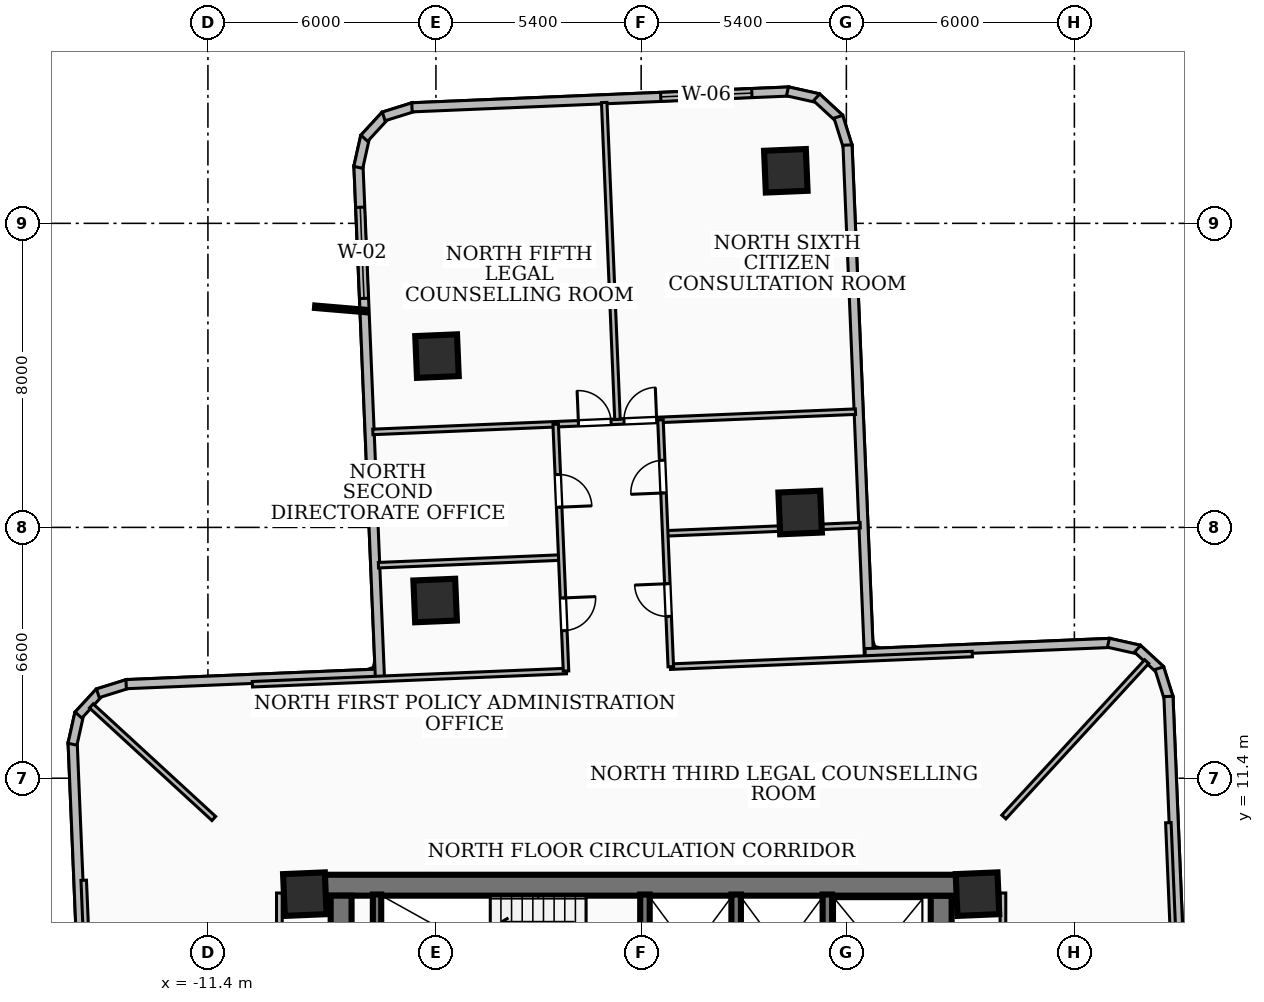
"""IFC4 building model, lengths in metres.
Left out: names, types, materials, properties, quantities, classifications, styles, units other than length and angle.
Written with IfcOpenShell. Run it as: python <this file> out.ifc"""

import sys

from ifc_helpers import new_model, si_unit, direction, frame, frame_2d, origin, origin_2d, place, context, subcontext, project, spatial, rectangle, extrude, element, fill, save


model = new_model("IFC4")
c1 = context("Model", 3, precision=1e-05, world=origin(), true_north=direction((0.0, 1.0)))
c2 = subcontext(c1, "Body", "Model", "MODEL_VIEW")
j1 = project(units=[si_unit("LENGTHUNIT", "METRE"), si_unit("PLANEANGLEUNIT", "RADIAN")], contexts=[c1])
p1 = place(None, origin())
s1 = spatial("IfcSite", under=j1, at=p1, CompositionType="ELEMENT")
p2 = place(p1, origin())
s2 = spatial("IfcBuilding", under=s1, at=p2, CompositionType="ELEMENT")
p3 = place(p2, frame((0.0, 0.0, 42.48)))
s3 = spatial("IfcBuildingStorey", under=s2, at=p3, CompositionType="ELEMENT", Elevation=42.48)
p4 = place(p3, frame((-8.78, 8.585, 0.0), z_axis=(0.0, 0.0, 1.0), x_axis=(1.0, 0.0, 0.0)))
e1 = element("IfcWall", 1, at=p4, inside=s3, PredefinedType="SHEAR", context=c2, shape_type="SweptSolid", body=[
    extrude(rectangle(XDim=17.56, YDim=0.55, at=frame_2d((8.78, 0.0))), origin(), (0.0, 0.0, 1.0), 3.34),
])
for number, where, z_axis, x_axis in (
    (2, (-7.895, 2.025, 0.0), (0.0, 0.0, 1.0), (0.0, 1.0, 0.0)),
    (3, (7.895, 8.31, 0.0), (0.0, 0.0, 1.0), (0.0, -1.0, 0.0)),
):
    element("IfcWall", number, at=place(p3, frame(where, z_axis=z_axis, x_axis=x_axis)), inside=s3, PredefinedType="SHEAR", context=c2, shape_type="SweptSolid", body=[
        extrude(rectangle(XDim=6.285, YDim=0.55, at=frame_2d((3.143, 0.0))), origin(), (0.0, 0.0, 1.0), 3.34),
    ])
p5 = place(p3, frame((-6.95, 5.28, 0.0), z_axis=(0.0, 0.0, 1.0), x_axis=(0.0, 1.0, 0.0)))
e4 = element("IfcWall", 4, at=p5, inside=s3, PredefinedType="SOLIDWALL", context=c2, shape_type="SweptSolid", body=[
    extrude(rectangle(XDim=3.06, YDim=0.22, at=frame_2d((1.53, 0.0))), origin(), (0.0, 0.0, 1.0), 3.34),
])
for number, where, z_axis, x_axis in (
    (5, (0.1, 5.3, 0.0), (0.0, 0.0, 1.0), (0.0, 1.0, 0.0)),
    (6, (2.5, 5.3, 0.0), (0.0, 0.0, 1.0), (0.0, 1.0, 0.0)),
    (7, (4.9, 5.3, 0.0), (0.0, 0.0, 1.0), (0.0, 1.0, 0.0)),
):
    element("IfcWall", number, at=place(p3, frame(where, z_axis=z_axis, x_axis=x_axis)), inside=s3, PredefinedType="SOLIDWALL", context=c2, shape_type="SweptSolid", body=[
        extrude(rectangle(XDim=3.04, YDim=0.25, at=frame_2d((1.52, 0.0))), origin(), (0.0, 0.0, 1.0), 3.34),
    ])
for number, where, z_axis, x_axis in (
    (8, (-8.85, 8.35, 0.0), (0.0, 0.0, 1.0), (0.999, 0.042, 0.0)),
    (9, (8.85, 8.35, 0.0), (0.0, 0.0, 1.0), (0.999, 0.042, 0.0)),
    (10, (4.184, 18.391, 0.0), (0.0, 0.0, 1.0), (0.999, 0.042, 0.0)),
    (11, (-5.421, 16.076, 0.0), (0.0, 0.0, 1.0), (0.999, 0.042, 0.0)),
    (12, (3.807, 27.383, 0.0), (0.0, 0.0, 1.0), (0.999, 0.042, 0.0)),
    (13, (-5.372, 22.507, 0.0), (0.0, 0.0, 1.0), (0.999, 0.042, 0.0)),
):
    element("IfcColumn", number, at=place(p3, frame(where, z_axis=z_axis, x_axis=x_axis)), inside=s3, PredefinedType="COLUMN", context=c2, shape_type="SweptSolid", body=[
        extrude(rectangle(XDim=1.1, YDim=1.1, at=origin_2d()), origin(), (0.0, 0.0, 1.0), 3.6),
    ])
p6 = place(p3, frame((-14.69, 5.894, 0.0), z_axis=(0.0, 0.0, 1.0), x_axis=(-0.041827173477, 0.999124860845, 0.0)))
e14 = element("IfcWall", 14, at=p6, inside=s3, PredefinedType="SOLIDWALL", context=c2, shape_type="SweptSolid", body=[
    extrude(rectangle(XDim=6.456, YDim=0.24, at=frame_2d((3.228, 0.0))), origin(), (0.0, 0.0, 1.0), 3.34),
])
p7 = place(p3, frame((-14.964, 12.295, 0.0), z_axis=(0.0, 0.0, 1.0), x_axis=(0.21736704137, 0.976089939158, 0.0)))
e15 = element("IfcWall", 15, at=p7, inside=s3, PredefinedType="SOLIDWALL", context=c2, shape_type="SweptSolid", body=[
    extrude(rectangle(XDim=0.829, YDim=0.24, at=frame_2d((0.415, 0.0))), origin(), (0.0, 0.0, 1.0), 3.34),
])
p8 = place(p3, frame((-14.806, 13.062, 0.0), z_axis=(0.0, 0.0, 1.0), x_axis=(0.677693750404, 0.735344259965, 0.0)))
e16 = element("IfcWall", 16, at=p8, inside=s3, PredefinedType="SOLIDWALL", context=c2, shape_type="SweptSolid", body=[
    extrude(rectangle(XDim=0.813, YDim=0.24, at=frame_2d((0.406, 0.0))), origin(), (0.0, 0.0, 1.0), 3.34),
])
p9 = place(p3, frame((-14.296, 13.635, 0.0), z_axis=(0.0, 0.0, 1.0), x_axis=(0.954396284631, 0.298542680168, 0.0)))
e17 = element("IfcWall", 17, at=p9, inside=s3, PredefinedType="SOLIDWALL", context=c2, shape_type="SweptSolid", body=[
    extrude(rectangle(XDim=0.831, YDim=0.24, at=frame_2d((0.416, 0.0))), origin(), (0.0, 0.0, 1.0), 3.34),
])
p10 = place(p3, frame((-13.552, 13.875, 0.0), z_axis=(0.0, 0.0, 1.0), x_axis=(0.999127443157, 0.041765444226, 0.0)))
e18 = element("IfcWall", 18, at=p10, inside=s3, PredefinedType="SOLIDWALL", context=c2, shape_type="SweptSolid", body=[
    extrude(rectangle(XDim=6.775, YDim=0.24, at=frame_2d((3.387, 0.0))), origin(), (0.0, 0.0, 1.0), 3.34),
])
p11 = place(p3, frame((-6.875, 14.058, 0.0), z_axis=(0.0, 0.0, 1.0), x_axis=(-0.041850586852, 0.999123880397, 0.0)))
e19 = element("IfcWall", 19, at=p11, inside=s3, PredefinedType="SOLIDWALL", context=c2, shape_type="SweptSolid", body=[
    extrude(rectangle(XDim=13.476, YDim=0.24, at=frame_2d((6.738, 0.0))), origin(), (0.0, 0.0, 1.0), 3.34),
])
p12 = place(p11, frame((9.976, 0.0, 0.85)))
e20 = element("IfcOpeningElement", 20, at=p12, cuts=e19, PredefinedType="OPENING", context=c2, shape_type="SweptSolid", body=[
    extrude(rectangle(XDim=2.4, YDim=2.1, at=frame_2d((1.2, 1.05))), frame((0.0, 0.13, 0.0), z_axis=(0.0, -1.0, 0.0), x_axis=(1.0, 0.0, 0.0)), (0.0, 0.0, 1.0), 0.26),
])
p13 = place(p3, frame((-7.443, 27.473, 0.0), z_axis=(0.0, 0.0, 1.0), x_axis=(0.21736704137, 0.976089939158, 0.0)))
e21 = element("IfcWall", 21, at=p13, inside=s3, PredefinedType="SOLIDWALL", context=c2, shape_type="SweptSolid", body=[
    extrude(rectangle(XDim=0.829, YDim=0.24, at=frame_2d((0.415, 0.0))), origin(), (0.0, 0.0, 1.0), 3.34),
])
p14 = place(p3, frame((-7.285, 28.24, 0.0), z_axis=(0.0, 0.0, 1.0), x_axis=(0.676946063044, 0.73603262681, 0.0)))
e22 = element("IfcWall", 22, at=p14, inside=s3, PredefinedType="SOLIDWALL", context=c2, shape_type="SweptSolid", body=[
    extrude(rectangle(XDim=0.814, YDim=0.24, at=frame_2d((0.407, 0.0))), origin(), (0.0, 0.0, 1.0), 3.34),
])
p15 = place(p3, frame((-6.775, 28.814, 0.0), z_axis=(0.0, 0.0, 1.0), x_axis=(0.954730695464, 0.297471509794, 0.0)))
e23 = element("IfcWall", 23, at=p15, inside=s3, PredefinedType="SOLIDWALL", context=c2, shape_type="SweptSolid", body=[
    extrude(rectangle(XDim=0.831, YDim=0.24, at=frame_2d((0.415, 0.0))), origin(), (0.0, 0.0, 1.0), 3.34),
])
p16 = place(p3, frame((-6.031, 29.053, 0.0), z_axis=(0.0, 0.0, 1.0), x_axis=(0.999123553269, 0.041858395859, 0.0)))
e24 = element("IfcWall", 24, at=p16, inside=s3, PredefinedType="SOLIDWALL", context=c2, shape_type="SweptSolid", body=[
    extrude(rectangle(XDim=9.939, YDim=0.24, at=frame_2d((4.969, 0.0))), origin(), (0.0, 0.0, 1.0), 3.34),
])
p17 = place(p16, frame((6.552, 0.0, 0.85)))
e25 = element("IfcOpeningElement", 25, at=p17, cuts=e24, PredefinedType="OPENING", context=c2, shape_type="SweptSolid", body=[
    extrude(rectangle(XDim=2.4, YDim=1.85, at=frame_2d((1.2, 0.925))), frame((0.0, 0.13, 0.0), z_axis=(0.0, -1.0, 0.0), x_axis=(1.0, 0.0, 0.0)), (0.0, 0.0, 1.0), 0.26),
])
p18 = place(p3, frame((3.85, 29.473, 0.0), z_axis=(0.0, 0.0, 1.0), x_axis=(0.976138507006, -0.217148831773, 0.0)))
e26 = element("IfcWall", 26, at=p18, inside=s3, PredefinedType="SOLIDWALL", context=c2, shape_type="SweptSolid", body=[
    extrude(rectangle(XDim=0.829, YDim=0.24, at=frame_2d((0.414, 0.0))), origin(), (0.0, 0.0, 1.0), 3.34),
])
p19 = place(p3, frame((4.617, 29.315, 0.0), z_axis=(0.0, 0.0, 1.0), x_axis=(0.735482115769, -0.677544136853, 0.0)))
e27 = element("IfcWall", 27, at=p19, inside=s3, PredefinedType="SOLIDWALL", context=c2, shape_type="SweptSolid", body=[
    extrude(rectangle(XDim=0.813, YDim=0.24, at=frame_2d((0.407, 0.0))), origin(), (0.0, 0.0, 1.0), 3.34),
])
p20 = place(p3, frame((5.19, 28.805, 0.0), z_axis=(0.0, 0.0, 1.0), x_axis=(0.298542680168, -0.954396284631, 0.0)))
e28 = element("IfcWall", 28, at=p20, inside=s3, PredefinedType="SOLIDWALL", context=c2, shape_type="SweptSolid", body=[
    extrude(rectangle(XDim=0.831, YDim=0.24, at=frame_2d((0.416, 0.0))), origin(), (0.0, 0.0, 1.0), 3.34),
])
p21 = place(p3, frame((5.43, 28.061, 0.0), z_axis=(0.0, 0.0, 1.0), x_axis=(0.041852859621, -0.999123785195, 0.0)))
e29 = element("IfcWall", 29, at=p21, inside=s3, PredefinedType="SOLIDWALL", context=c2, shape_type="SweptSolid", body=[
    extrude(rectangle(XDim=13.475, YDim=0.24, at=frame_2d((6.737, 0.0))), origin(), (0.0, 0.0, 1.0), 2.421),
])
p22 = place(p3, frame((5.894, 14.69, 0.0), z_axis=(0.0, 0.0, 1.0), x_axis=(0.999124860845, 0.041827173477, 0.0)))
e30 = element("IfcWall", 30, at=p22, inside=s3, PredefinedType="SOLIDWALL", context=c2, shape_type="SweptSolid", body=[
    extrude(rectangle(XDim=6.456, YDim=0.24, at=frame_2d((3.228, 0.0))), origin(), (0.0, 0.0, 1.0), 2.421),
])
p23 = place(p3, frame((12.295, 14.964, 0.0), z_axis=(0.0, 0.0, 1.0), x_axis=(0.976089939158, -0.21736704137, 0.0)))
e31 = element("IfcWall", 31, at=p23, inside=s3, PredefinedType="SOLIDWALL", context=c2, shape_type="SweptSolid", body=[
    extrude(rectangle(XDim=0.829, YDim=0.24, at=frame_2d((0.415, 0.0))), origin(), (0.0, 0.0, 1.0), 3.34),
])
p24 = place(p3, frame((13.062, 14.806, 0.0), z_axis=(0.0, 0.0, 1.0), x_axis=(0.735344259965, -0.677693750404, 0.0)))
e32 = element("IfcWall", 32, at=p24, inside=s3, PredefinedType="SOLIDWALL", context=c2, shape_type="SweptSolid", body=[
    extrude(rectangle(XDim=0.813, YDim=0.24, at=frame_2d((0.406, 0.0))), origin(), (0.0, 0.0, 1.0), 3.34),
])
p25 = place(p3, frame((13.635, 14.296, 0.0), z_axis=(0.0, 0.0, 1.0), x_axis=(0.298542680168, -0.954396284631, 0.0)))
e33 = element("IfcWall", 33, at=p25, inside=s3, PredefinedType="SOLIDWALL", context=c2, shape_type="SweptSolid", body=[
    extrude(rectangle(XDim=0.831, YDim=0.24, at=frame_2d((0.416, 0.0))), origin(), (0.0, 0.0, 1.0), 3.34),
])
p26 = place(p3, frame((13.875, 13.552, 0.0), z_axis=(0.0, 0.0, 1.0), x_axis=(0.041765444226, -0.999127443157, 0.0)))
e34 = element("IfcWall", 34, at=p26, inside=s3, PredefinedType="SOLIDWALL", context=c2, shape_type="SweptSolid", body=[
    extrude(rectangle(XDim=6.775, YDim=0.24, at=frame_2d((3.387, 0.0))), origin(), (0.0, 0.0, 1.0), 3.34),
])
p27 = place(p3, frame((14.058, 6.875, 0.0), z_axis=(0.0, 0.0, 1.0), x_axis=(0.999124376175, 0.04183874918, 0.0)))
e35 = element("IfcWall", 35, at=p27, inside=s3, PredefinedType="SOLIDWALL", context=c2, shape_type="SweptSolid", body=[
    extrude(rectangle(XDim=16.876, YDim=0.24, at=frame_2d((8.438, 0.0))), origin(), (0.0, 0.0, 1.0), 3.34),
])
p28 = place(p27, frame((13.376, 0.0, 0.85)))
e36 = element("IfcOpeningElement", 36, at=p28, cuts=e35, PredefinedType="OPENING", context=c2, shape_type="SweptSolid", body=[
    extrude(rectangle(XDim=2.4, YDim=1.85, at=frame_2d((1.2, 0.925))), frame((0.0, 0.13, 0.0), z_axis=(0.0, -1.0, 0.0), x_axis=(1.0, 0.0, 0.0)), (0.0, 0.0, 1.0), 0.26),
])
for number, where, z_axis, x_axis in (
    (37, (-9.52, 1.75, 0.0), (0.0, 0.0, 1.0), (0.0, 1.0, 0.0)),
    (38, (9.52, 1.75, 0.0), (0.0, 0.0, 1.0), (0.0, 1.0, 0.0)),
):
    element("IfcWall", number, at=place(p3, frame(where, z_axis=z_axis, x_axis=x_axis)), inside=s3, PredefinedType="PARTITIONING", context=c2, shape_type="SweptSolid", body=[
        extrude(rectangle(XDim=6.63, YDim=0.15, at=frame_2d((3.315, 0.0))), origin(), (0.0, 0.0, 1.0), 2.421),
    ])
p29 = place(p3, frame((9.544, 10.38, 0.0), z_axis=(0.0, 0.0, 1.0), x_axis=(0.676856513188, 0.736114977809, 0.0)))
e39 = element("IfcWall", 39, at=p29, inside=s3, PredefinedType="PARTITIONING", context=c2, shape_type="SweptSolid", body=[
    extrude(rectangle(XDim=5.554, YDim=0.145, at=frame_2d((2.777, 0.0))), origin(), (0.0, 0.0, 1.0), 3.34),
])
p30 = place(p3, frame((-11.245, 10.34, 0.0), z_axis=(0.0, 0.0, 1.0), x_axis=(-0.736178820698, 0.676787074312, 0.0)))
e40 = element("IfcWall", 40, at=p30, inside=s3, PredefinedType="PARTITIONING", context=c2, shape_type="SweptSolid", body=[
    extrude(rectangle(XDim=4.378, YDim=0.145, at=frame_2d((2.189, 0.0))), origin(), (0.0, 0.0, 1.0), 3.34),
])
for number, where, z_axis, x_axis in (
    (41, (14.22, 1.967, 0.0), (0.0, 0.0, 1.0), (-0.042, 0.999, 0.0)),
    (42, (-1.967, 14.22, 0.0), (0.0, 0.0, 1.0), (-0.999, -0.042, 0.0)),
):
    element("IfcWall", number, at=place(p3, frame(where, z_axis=z_axis, x_axis=x_axis)), inside=s3, PredefinedType="PARTITIONING", context=c2, shape_type="SweptSolid", body=[
        extrude(rectangle(XDim=8.27, YDim=0.145, at=frame_2d((4.135, 0.0))), origin(), (0.0, 0.0, 1.0), 2.421),
    ])
p31 = place(p3, frame((8.714, 14.668, 0.0), z_axis=(0.0, 0.0, 1.0), x_axis=(-0.999122557945, -0.041882146625, 0.0)))
e43 = element("IfcWall", 43, at=p31, inside=s3, PredefinedType="PARTITIONING", context=c2, shape_type="SweptSolid", body=[
    extrude(rectangle(XDim=7.951, YDim=0.145, at=frame_2d((3.976, 0.0))), origin(), (0.0, 0.0, 1.0), 2.421),
])
p32 = place(p3, frame((-2.122, 17.206, 0.0), z_axis=(0.0, 0.0, 1.0), x_axis=(-0.999119609111, -0.041952433648, 0.0)))
e44 = element("IfcWall", 44, at=p32, inside=s3, PredefinedType="PARTITIONING", context=c2, shape_type="SweptSolid", body=[
    extrude(rectangle(XDim=4.795, YDim=0.145, at=frame_2d((2.397, 0.0))), origin(), (0.0, 0.0, 1.0), 2.421),
])
p33 = place(p3, frame((5.764, 18.057, 0.0), z_axis=(0.0, 0.0, 1.0), x_axis=(-0.999125612634, -0.041809211649, 0.0)))
e45 = element("IfcWall", 45, at=p33, inside=s3, PredefinedType="PARTITIONING", context=c2, shape_type="SweptSolid", body=[
    extrude(rectangle(XDim=5.115, YDim=0.145, at=frame_2d((2.558, 0.0))), origin(), (0.0, 0.0, 1.0), 2.421),
])
p34 = place(p3, frame((-2.249, 20.714, 0.0), z_axis=(0.0, 0.0, 1.0), x_axis=(0.041843020894, -0.999124197286, 0.0)))
e46 = element("IfcWall", 46, at=p34, inside=s3, PredefinedType="PARTITIONING", context=c2, shape_type="SweptSolid", body=[
    extrude(rectangle(XDim=6.5, YDim=0.145, at=frame_2d((3.25, 0.0))), origin(), (0.0, 0.0, 1.0), 3.34),
])
p35 = place(p34, frame((4.575, 0.0, 0.0)))
e47 = element("IfcOpeningElement", 47, at=p35, cuts=e46, PredefinedType="OPENING", context=c2, shape_type="SweptSolid", body=[
    extrude(rectangle(XDim=0.86, YDim=2.04, at=frame_2d((0.43, 1.02))), frame((0.0, 0.083, 0.0), z_axis=(0.0, -1.0, 0.0), x_axis=(1.0, 0.0, 0.0)), (0.0, 0.0, 1.0), 0.165),
])
p36 = place(p34, frame((1.325, 0.0, 0.0)))
e48 = element("IfcOpeningElement", 48, at=p36, cuts=e46, PredefinedType="OPENING", context=c2, shape_type="SweptSolid", body=[
    extrude(rectangle(XDim=0.86, YDim=2.04, at=frame_2d((0.43, 1.02))), frame((0.0, 0.083, 0.0), z_axis=(0.0, -1.0, 0.0), x_axis=(1.0, 0.0, 0.0)), (0.0, 0.0, 1.0), 0.165),
])
p37 = place(p3, frame((0.78, 14.335, 0.0), z_axis=(0.0, 0.0, 1.0), x_axis=(-0.041836740669, 0.99912446028, 0.0)))
e49 = element("IfcWall", 49, at=p37, inside=s3, PredefinedType="PARTITIONING", context=c2, shape_type="SweptSolid", body=[
    extrude(rectangle(XDim=6.501, YDim=0.145, at=frame_2d((3.25, 0.0))), origin(), (0.0, 0.0, 1.0), 3.34),
])
p38 = place(p37, frame((1.325, 0.0, 0.0)))
e50 = element("IfcOpeningElement", 50, at=p38, cuts=e49, PredefinedType="OPENING", context=c2, shape_type="SweptSolid", body=[
    extrude(rectangle(XDim=0.86, YDim=2.04, at=frame_2d((0.43, 1.02))), frame((0.0, 0.083, 0.0), z_axis=(0.0, -1.0, 0.0), x_axis=(1.0, 0.0, 0.0)), (0.0, 0.0, 1.0), 0.165),
])
p39 = place(p37, frame((4.575, 0.0, 0.0)))
e51 = element("IfcOpeningElement", 51, at=p39, cuts=e49, PredefinedType="OPENING", context=c2, shape_type="SweptSolid", body=[
    extrude(rectangle(XDim=0.86, YDim=2.04, at=frame_2d((0.43, 1.02))), frame((0.0, 0.083, 0.0), z_axis=(0.0, -1.0, 0.0), x_axis=(1.0, 0.0, 0.0)), (0.0, 0.0, 1.0), 0.165),
])
p40 = place(p3, frame((-0.623, 20.842, 0.0), z_axis=(0.0, 0.0, 1.0), x_axis=(-0.041805771438, 0.999125756586, 0.0)))
e52 = element("IfcWall", 52, at=p40, inside=s3, PredefinedType="PARTITIONING", context=c2, shape_type="SweptSolid", body=[
    extrude(rectangle(XDim=8.345, YDim=0.145, at=frame_2d((4.173, 0.0))), origin(), (0.0, 0.0, 1.0), 2.832),
])
p41 = place(p3, frame((-7.06, 20.512, 0.0), z_axis=(0.0, 0.0, 1.0), x_axis=(0.99912047737, 0.041931750497, 0.0)))
e53 = element("IfcWall", 53, at=p41, inside=s3, PredefinedType="PARTITIONING", context=c2, shape_type="SweptSolid", body=[
    extrude(rectangle(XDim=12.71, YDim=0.145, at=frame_2d((6.355, 0.0))), origin(), (0.0, 0.0, 1.0), 2.421),
])
p42 = place(p41, frame((6.615, 0.0, 0.0)))
e54 = element("IfcOpeningElement", 54, at=p42, cuts=e53, PredefinedType="OPENING", context=c2, shape_type="SweptSolid", body=[
    extrude(rectangle(XDim=0.86, YDim=2.04, at=frame_2d((0.43, 1.02))), frame((0.0, 0.083, 0.0), z_axis=(0.0, -1.0, 0.0), x_axis=(1.0, 0.0, 0.0)), (0.0, 0.0, 1.0), 0.165),
])
p43 = place(p41, frame((5.415, 0.0, 0.0)))
e55 = element("IfcOpeningElement", 55, at=p43, cuts=e53, PredefinedType="OPENING", context=c2, shape_type="SweptSolid", body=[
    extrude(rectangle(XDim=0.86, YDim=2.04, at=frame_2d((0.43, 1.02))), frame((0.0, 0.083, 0.0), z_axis=(0.0, -1.0, 0.0), x_axis=(1.0, 0.0, 0.0)), (0.0, 0.0, 1.0), 0.165),
])
p44 = place(p3, frame((-14.668, 8.714, 0.0), z_axis=(0.0, 0.0, 1.0), x_axis=(0.041882146625, -0.999122557945, 0.0)))
e56 = element("IfcWall", 56, at=p44, inside=s3, PredefinedType="PARTITIONING", context=c2, shape_type="SweptSolid", body=[
    extrude(rectangle(XDim=7.951, YDim=0.145, at=frame_2d((3.976, 0.0))), origin(), (0.0, 0.0, 1.0), 2.421),
])
p45 = place(p12, origin())
e57 = element("IfcWindow", 57, at=p45, inside=s3, PartitioningType="SINGLE_PANEL", PredefinedType="WINDOW", context=c2, shape_type="SweptSolid", body=[
    extrude(rectangle(XDim=2.4, YDim=2.1, at=frame_2d((1.2, 1.05))), frame((0.0, 0.03, 0.0), z_axis=(0.0, -1.0, 0.0), x_axis=(1.0, 0.0, 0.0)), (0.0, 0.0, 1.0), 0.06),
])
fill(e20, e57)
p46 = place(p17, origin())
e58 = element("IfcWindow", 58, at=p46, inside=s3, PartitioningType="SINGLE_PANEL", PredefinedType="WINDOW", context=c2, shape_type="SweptSolid", body=[
    extrude(rectangle(XDim=2.4, YDim=1.85, at=frame_2d((1.2, 0.925))), frame((0.0, 0.03, 0.0), z_axis=(0.0, -1.0, 0.0), x_axis=(1.0, 0.0, 0.0)), (0.0, 0.0, 1.0), 0.06),
])
fill(e25, e58)
p47 = place(p35, origin())
e59 = element("IfcDoor", 59, at=p47, inside=s3, OperationType="SINGLE_SWING_LEFT", PredefinedType="DOOR", context=c2, shape_type="SweptSolid", body=[
    extrude(rectangle(XDim=0.86, YDim=2.04, at=frame_2d((0.43, 1.02))), frame((0.0, 0.025, 0.0), z_axis=(0.0, -1.0, 0.0), x_axis=(1.0, 0.0, 0.0)), (0.0, 0.0, 1.0), 0.05),
])
fill(e47, e59)
p48 = place(p36, origin())
e60 = element("IfcDoor", 60, at=p48, inside=s3, OperationType="SINGLE_SWING_RIGHT", PredefinedType="DOOR", context=c2, shape_type="SweptSolid", body=[
    extrude(rectangle(XDim=0.86, YDim=2.04, at=frame_2d((0.43, 1.02))), frame((0.0, 0.025, 0.0), z_axis=(0.0, -1.0, 0.0), x_axis=(1.0, 0.0, 0.0)), (0.0, 0.0, 1.0), 0.05),
])
fill(e48, e60)
p49 = place(p38, origin())
e61 = element("IfcDoor", 61, at=p49, inside=s3, OperationType="SINGLE_SWING_RIGHT", PredefinedType="DOOR", context=c2, shape_type="SweptSolid", body=[
    extrude(rectangle(XDim=0.86, YDim=2.04, at=frame_2d((0.43, 1.02))), frame((0.0, 0.025, 0.0), z_axis=(0.0, -1.0, 0.0), x_axis=(1.0, 0.0, 0.0)), (0.0, 0.0, 1.0), 0.05),
])
fill(e50, e61)
p50 = place(p39, origin())
e62 = element("IfcDoor", 62, at=p50, inside=s3, OperationType="SINGLE_SWING_LEFT", PredefinedType="DOOR", context=c2, shape_type="SweptSolid", body=[
    extrude(rectangle(XDim=0.86, YDim=2.04, at=frame_2d((0.43, 1.02))), frame((0.0, 0.025, 0.0), z_axis=(0.0, -1.0, 0.0), x_axis=(1.0, 0.0, 0.0)), (0.0, 0.0, 1.0), 0.05),
])
fill(e51, e62)
p51 = place(p42, origin())
e63 = element("IfcDoor", 63, at=p51, inside=s3, OperationType="SINGLE_SWING_RIGHT", PredefinedType="DOOR", context=c2, shape_type="SweptSolid", body=[
    extrude(rectangle(XDim=0.86, YDim=2.04, at=frame_2d((0.43, 1.02))), frame((0.0, 0.025, 0.0), z_axis=(0.0, -1.0, 0.0), x_axis=(1.0, 0.0, 0.0)), (0.0, 0.0, 1.0), 0.05),
])
fill(e54, e63)
p52 = place(p43, origin())
e64 = element("IfcDoor", 64, at=p52, inside=s3, OperationType="SINGLE_SWING_LEFT", PredefinedType="DOOR", context=c2, shape_type="SweptSolid", body=[
    extrude(rectangle(XDim=0.86, YDim=2.04, at=frame_2d((0.43, 1.02))), frame((0.0, 0.025, 0.0), z_axis=(0.0, -1.0, 0.0), x_axis=(1.0, 0.0, 0.0)), (0.0, 0.0, 1.0), 0.05),
])
fill(e55, e64)
save(model, sys.argv[1])
